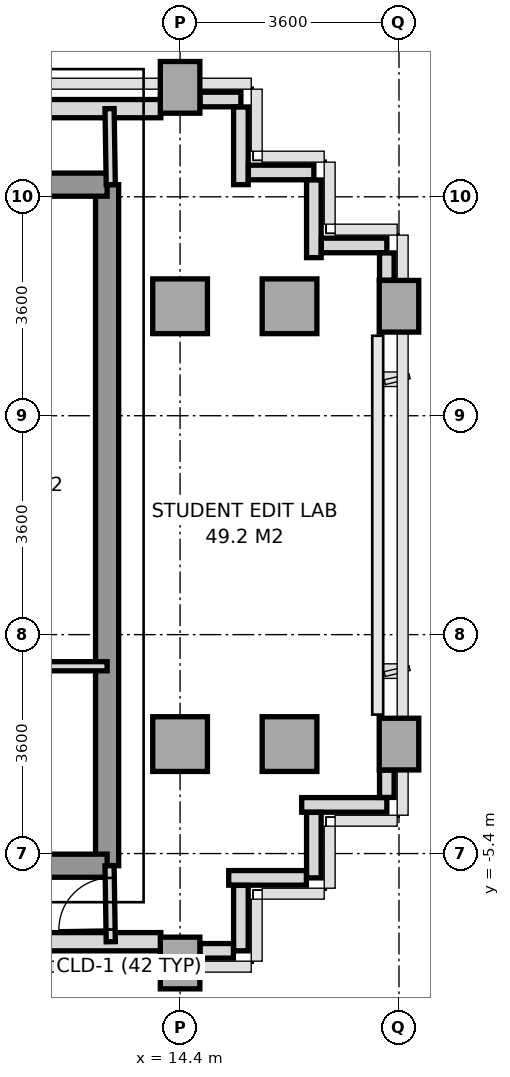
"""IFC4 building model, lengths in metres.
Left out: names, types, materials, properties, quantities, classifications, styles, units other than length and angle.
Written with IfcOpenShell. Run it as: python <this file> out.ifc"""

import sys

from ifc_helpers import new_model, si_unit, direction, frame, frame_2d, origin, origin_2d, place, context, subcontext, project, spatial, rectangle, extrude, source, transform, mapped, element, fill, save


model = new_model("IFC4")
c1 = context("Model", 3, precision=1e-05, world=origin(), true_north=direction((0.0, 1.0)))
c2 = subcontext(c1, "Body", "Model", "MODEL_VIEW")
j1 = project(units=[si_unit("LENGTHUNIT", "METRE"), si_unit("PLANEANGLEUNIT", "RADIAN")], contexts=[c1])
p1 = place(None, origin())
s1 = spatial("IfcSite", under=j1, at=p1, CompositionType="ELEMENT")
p2 = place(p1, origin())
s2 = spatial("IfcBuilding", under=s1, at=p2, CompositionType="ELEMENT")
p3 = place(p2, frame((0.0, 0.0, 170.6)))
s3 = spatial("IfcBuildingStorey", under=s2, at=p3, CompositionType="ELEMENT", Elevation=170.6)
m1 = source(origin(), c2, "Body", "SweptSolid", [
    extrude(rectangle(XDim=0.65, YDim=0.85, at=origin_2d()), origin(), (0.0, 0.0, 1.0), 3.2),
])
p4 = place(p3, frame((14.4, -7.2, 0.0), z_axis=(0.0, 0.0, 1.0), x_axis=(1.0, 0.0, 0.0)))
e1 = element("IfcColumn", 1, at=p4, inside=s3, PredefinedType="COLUMN", context=c2, shape_type="MappedRepresentation", body=[
    mapped(m1, transform((0.0, 0.0, 0.0), x_axis=(1.0, 0.0, 0.0), y_axis=(0.0, 1.0, 0.0), z_axis=(0.0, 0.0, 1.0), scale=1.0)),
])
m2 = source(origin(), c2, "Body", "SweptSolid", [
    extrude(rectangle(XDim=0.9, YDim=0.9, at=origin_2d()), origin(), (0.0, 0.0, 1.0), 3.2),
])
for number, where, z_axis, x_axis in (
    (2, (14.4, -3.6, 0.0), (0.0, 0.0, 1.0), (1.0, 0.0, 0.0)),
    (3, (14.4, 3.6, 0.0), (0.0, 0.0, 1.0), (1.0, 0.0, 0.0)),
):
    element("IfcColumn", number, at=place(p3, frame(where, z_axis=z_axis, x_axis=x_axis)), inside=s3, PredefinedType="COLUMN", context=c2, shape_type="MappedRepresentation", body=[
        mapped(m2, transform((0.0, 0.0, 0.0), x_axis=(1.0, 0.0, 0.0), y_axis=(0.0, 1.0, 0.0), z_axis=(0.0, 0.0, 1.0), scale=1.0)),
    ])
p5 = place(p3, frame((14.4, 7.2, 0.0), z_axis=(0.0, 0.0, 1.0), x_axis=(1.0, 0.0, 0.0)))
e4 = element("IfcColumn", 4, at=p5, inside=s3, PredefinedType="COLUMN", context=c2, shape_type="MappedRepresentation", body=[
    mapped(m1, transform((0.0, 0.0, 0.0), x_axis=(1.0, 0.0, 0.0), y_axis=(0.0, 1.0, 0.0), z_axis=(0.0, 0.0, 1.0), scale=1.0)),
])
for number, where, z_axis, x_axis in (
    (5, (16.2, -3.6, 0.0), (0.0, 0.0, 1.0), (1.0, 0.0, 0.0)),
    (6, (16.2, 3.6, 0.0), (0.0, 0.0, 1.0), (1.0, 0.0, 0.0)),
):
    element("IfcColumn", number, at=place(p3, frame(where, z_axis=z_axis, x_axis=x_axis)), inside=s3, PredefinedType="COLUMN", context=c2, shape_type="MappedRepresentation", body=[
        mapped(m2, transform((0.0, 0.0, 0.0), x_axis=(1.0, 0.0, 0.0), y_axis=(0.0, 1.0, 0.0), z_axis=(0.0, 0.0, 1.0), scale=1.0)),
    ])
for number, where, z_axis, x_axis in (
    (7, (18.0, -3.6, 0.0), (0.0, 0.0, 1.0), (1.0, 0.0, 0.0)),
    (8, (18.0, 3.6, 0.0), (0.0, 0.0, 1.0), (1.0, 0.0, 0.0)),
):
    element("IfcColumn", number, at=place(p3, frame(where, z_axis=z_axis, x_axis=x_axis)), inside=s3, PredefinedType="COLUMN", context=c2, shape_type="MappedRepresentation", body=[
        mapped(m1, transform((0.0, 0.0, 0.0), x_axis=(1.0, 0.0, 0.0), y_axis=(0.0, 1.0, 0.0), z_axis=(0.0, 0.0, 1.0), scale=1.0)),
    ])
p6 = place(p3, frame((11.448, 6.85, 0.0), z_axis=(0.0, 0.0, 1.0), x_axis=(1.0, 0.0, 0.0)))
e9 = element("IfcWall", 9, at=p6, inside=s3, PredefinedType="SOLIDWALL", context=c2, shape_type="SweptSolid", body=[
    extrude(rectangle(XDim=2.635, YDim=0.3, at=frame_2d((1.317, 0.0))), origin(), (0.0, 0.0, 1.0), 3.2),
])
p7 = place(p3, frame((11.75, -6.85, 0.0), z_axis=(0.0, 0.0, 1.0), x_axis=(1.0, 0.0, 0.0)))
e10 = element("IfcWall", 10, at=p7, inside=s3, PredefinedType="SOLIDWALL", context=c2, shape_type="SweptSolid", body=[
    extrude(rectangle(XDim=2.333, YDim=0.3, at=frame_2d((1.167, 0.0))), origin(), (0.0, 0.0, 1.0), 3.2),
])
p8 = place(p3, frame((17.8, -4.6, 0.0), z_axis=(0.0, 0.0, 1.0), x_axis=(-1.0, 0.0, 0.0)))
e11 = element("IfcWall", 11, at=p8, inside=s3, PredefinedType="PARAPET", context=c2, shape_type="SweptSolid", body=[
    extrude(rectangle(XDim=1.4, YDim=0.24, at=frame_2d((0.7, 0.0))), origin(), (0.0, 0.0, 1.0), 1.15),
])
p9 = place(p3, frame((16.6, -4.723, 0.0), z_axis=(0.0, 0.0, 1.0), x_axis=(0.0, -1.0, 0.0)))
e12 = element("IfcWall", 12, at=p9, inside=s3, PredefinedType="PARAPET", context=c2, shape_type="SweptSolid", body=[
    extrude(rectangle(XDim=1.077, YDim=0.24, at=frame_2d((0.539, 0.0))), origin(), (0.0, 0.0, 1.0), 1.15),
])
p10 = place(p3, frame((16.477, -5.8, 0.0), z_axis=(0.0, 0.0, 1.0), x_axis=(-1.0, 0.0, 0.0)))
e13 = element("IfcWall", 13, at=p10, inside=s3, PredefinedType="PARAPET", context=c2, shape_type="SweptSolid", body=[
    extrude(rectangle(XDim=1.277, YDim=0.24, at=frame_2d((0.639, 0.0))), origin(), (0.0, 0.0, 1.0), 1.15),
])
p11 = place(p3, frame((15.4, -5.923, 0.0), z_axis=(0.0, 0.0, 1.0), x_axis=(0.0, -1.0, 0.0)))
e14 = element("IfcWall", 14, at=p11, inside=s3, PredefinedType="PARAPET", context=c2, shape_type="SweptSolid", body=[
    extrude(rectangle(XDim=1.077, YDim=0.24, at=frame_2d((0.539, 0.0))), origin(), (0.0, 0.0, 1.0), 1.15),
])
p12 = place(p3, frame((15.277, -7.0, 0.0), z_axis=(0.0, 0.0, 1.0), x_axis=(-1.0, 0.0, 0.0)))
e15 = element("IfcWall", 15, at=p12, inside=s3, PredefinedType="PARAPET", context=c2, shape_type="SweptSolid", body=[
    extrude(rectangle(XDim=0.549, YDim=0.24, at=frame_2d((0.274, 0.0))), origin(), (0.0, 0.0, 1.0), 1.15),
])
p13 = place(p3, frame((14.728, 7.0, 0.0), z_axis=(0.0, 0.0, 1.0), x_axis=(1.0, 0.0, 0.0)))
e16 = element("IfcWall", 16, at=p13, inside=s3, PredefinedType="PARAPET", context=c2, shape_type="SweptSolid", body=[
    extrude(rectangle(XDim=0.672, YDim=0.24, at=frame_2d((0.336, 0.0))), origin(), (0.0, 0.0, 1.0), 1.15),
])
p14 = place(p3, frame((15.4, 6.877, 0.0), z_axis=(0.0, 0.0, 1.0), x_axis=(0.0, -1.0, 0.0)))
e17 = element("IfcWall", 17, at=p14, inside=s3, PredefinedType="PARAPET", context=c2, shape_type="SweptSolid", body=[
    extrude(rectangle(XDim=1.277, YDim=0.24, at=frame_2d((0.638, 0.0))), origin(), (0.0, 0.0, 1.0), 1.15),
])
p15 = place(p3, frame((15.523, 5.8, 0.0), z_axis=(0.0, 0.0, 1.0), x_axis=(1.0, 0.0, 0.0)))
e18 = element("IfcWall", 18, at=p15, inside=s3, PredefinedType="PARAPET", context=c2, shape_type="SweptSolid", body=[
    extrude(rectangle(XDim=1.077, YDim=0.24, at=frame_2d((0.539, 0.0))), origin(), (0.0, 0.0, 1.0), 1.15),
])
p16 = place(p3, frame((16.6, 5.677, 0.0), z_axis=(0.0, 0.0, 1.0), x_axis=(0.0, -1.0, 0.0)))
e19 = element("IfcWall", 19, at=p16, inside=s3, PredefinedType="PARAPET", context=c2, shape_type="SweptSolid", body=[
    extrude(rectangle(XDim=1.277, YDim=0.24, at=frame_2d((0.639, 0.0))), origin(), (0.0, 0.0, 1.0), 1.15),
])
p17 = place(p3, frame((16.723, 4.6, 0.0), z_axis=(0.0, 0.0, 1.0), x_axis=(1.0, 0.0, 0.0)))
e20 = element("IfcWall", 20, at=p17, inside=s3, PredefinedType="PARAPET", context=c2, shape_type="SweptSolid", body=[
    extrude(rectangle(XDim=1.077, YDim=0.24, at=frame_2d((0.539, 0.0))), origin(), (0.0, 0.0, 1.0), 1.15),
])
for number, where, z_axis, x_axis in (
    (21, (17.8, 4.477, 0.0), (0.0, 0.0, 1.0), (0.0, -1.0, 0.0)),
    (22, (17.8, -4.028, 0.0), (0.0, 0.0, 1.0), (0.0, -1.0, 0.0)),
):
    element("IfcWall", number, at=place(p3, frame(where, z_axis=z_axis, x_axis=x_axis)), inside=s3, PredefinedType="PARAPET", context=c2, shape_type="SweptSolid", body=[
        extrude(rectangle(XDim=0.449, YDim=0.24, at=frame_2d((0.225, 0.0))), origin(), (0.0, 0.0, 1.0), 1.15),
    ])
p18 = place(p3, frame((13.2, -5.6, 0.0), z_axis=(0.0, 0.0, 1.0), x_axis=(0.0, 1.0, 0.0)))
e23 = element("IfcWall", 23, at=p18, inside=s3, PredefinedType="SHEAR", context=c2, shape_type="SweptSolid", body=[
    extrude(rectangle(XDim=11.2, YDim=0.38, at=frame_2d((5.6, 0.0))), origin(), (0.0, 0.0, 1.0), 3.2),
])
p19 = place(p3, frame((11.356, 5.6, 0.0), z_axis=(0.0, 0.0, 1.0), x_axis=(1.0, 0.0, 0.0)))
e24 = element("IfcWall", 24, at=p19, inside=s3, PredefinedType="SHEAR", context=c2, shape_type="SweptSolid", body=[
    extrude(rectangle(XDim=1.844, YDim=0.38, at=frame_2d((0.922, 0.0))), origin(), (0.0, 0.0, 1.0), 3.2),
])
p20 = place(p3, frame((5.4, -5.6, 0.0), z_axis=(0.0, 0.0, 1.0), x_axis=(1.0, 0.0, 0.0)))
e25 = element("IfcWall", 25, at=p20, inside=s3, PredefinedType="SHEAR", context=c2, shape_type="SweptSolid", body=[
    extrude(rectangle(XDim=7.8, YDim=0.38, at=frame_2d((3.9, 0.0))), origin(), (0.0, 0.0, 1.0), 3.2),
])
p21 = place(p20, frame((3.0, 0.0, 0.0)))
e26 = element("IfcOpeningElement", 26, at=p21, cuts=e25, PredefinedType="OPENING", context=c2, shape_type="SweptSolid", body=[
    extrude(rectangle(XDim=1.2, YDim=2.2, at=frame_2d((0.6, 1.1))), frame((0.0, 0.2, 0.0), z_axis=(0.0, -1.0, 0.0), x_axis=(1.0, 0.0, 0.0)), (0.0, 0.0, 1.0), 0.4),
])
p22 = place(p20, frame((5.85, 0.0, 0.0)))
e27 = element("IfcOpeningElement", 27, at=p22, cuts=e25, PredefinedType="OPENING", context=c2, shape_type="SweptSolid", body=[
    extrude(rectangle(XDim=0.8, YDim=2.1, at=frame_2d((0.4, 1.05))), frame((0.0, 0.2, 0.0), z_axis=(0.0, -1.0, 0.0), x_axis=(1.0, 0.0, 0.0)), (0.0, 0.0, 1.0), 0.4),
])
p23 = place(p3, frame((11.02, -2.32, 0.0), z_axis=(0.0, 0.0, 1.0), x_axis=(1.0, 0.0, 0.0)))
e28 = element("IfcWall", 28, at=p23, inside=s3, PredefinedType="PARTITIONING", context=c2, shape_type="SweptSolid", body=[
    extrude(rectangle(XDim=2.18, YDim=0.15, at=frame_2d((1.09, 0.0))), origin(), (0.0, 0.0, 1.0), 3.2),
])
p24 = place(p3, frame((13.26, 5.6, 0.0), z_axis=(0.0, 0.0, 1.0), x_axis=(-0.016013571389, 0.999871774545, 0.0)))
e29 = element("IfcWall", 29, at=p24, inside=s3, PredefinedType="PARTITIONING", context=c2, shape_type="SweptSolid", body=[
    extrude(rectangle(XDim=1.25, YDim=0.15, at=frame_2d((0.625, 0.0))), origin(), (0.0, 0.0, 1.0), 3.2),
])
p25 = place(p3, frame((13.26, -6.85, 0.0), z_axis=(0.0, 0.0, 1.0), x_axis=(-0.016013571389, 0.999871774545, 0.0)))
e30 = element("IfcWall", 30, at=p25, inside=s3, PredefinedType="PARTITIONING", context=c2, shape_type="SweptSolid", body=[
    extrude(rectangle(XDim=1.25, YDim=0.15, at=frame_2d((0.625, 0.0))), origin(), (0.0, 0.0, 1.0), 3.2),
])
p26 = place(p25, frame((0.2, 0.0, 0.0)))
e31 = element("IfcOpeningElement", 31, at=p26, cuts=e30, PredefinedType="OPENING", context=c2, shape_type="SweptSolid", body=[
    extrude(rectangle(XDim=0.85, YDim=2.1, at=frame_2d((0.425, 1.05))), frame((0.0, 0.085, 0.0), z_axis=(0.0, -1.0, 0.0), x_axis=(1.0, 0.0, 0.0)), (0.0, 0.0, 1.0), 0.17),
])
m3 = source(origin(), c2, "Body", "SweptSolid", [
    extrude(rectangle(XDim=0.85, YDim=2.1, at=frame_2d((0.425, 1.05))), frame((0.0, 0.025, 0.0), z_axis=(0.0, -1.0, 0.0), x_axis=(1.0, 0.0, 0.0)), (0.0, 0.0, 1.0), 0.05),
])
p27 = place(p26, origin())
e32 = element("IfcDoor", 32, at=p27, inside=s3, OperationType="SINGLE_SWING_LEFT", PredefinedType="DOOR", context=c2, shape_type="MappedRepresentation", body=[
    mapped(m3, transform((0.0, 0.0, 0.0), x_axis=(1.0, 0.0, 0.0), y_axis=(0.0, 1.0, 0.0), z_axis=(0.0, 0.0, 1.0), scale=1.0)),
])
fill(e31, e32)
save(model, sys.argv[1])
